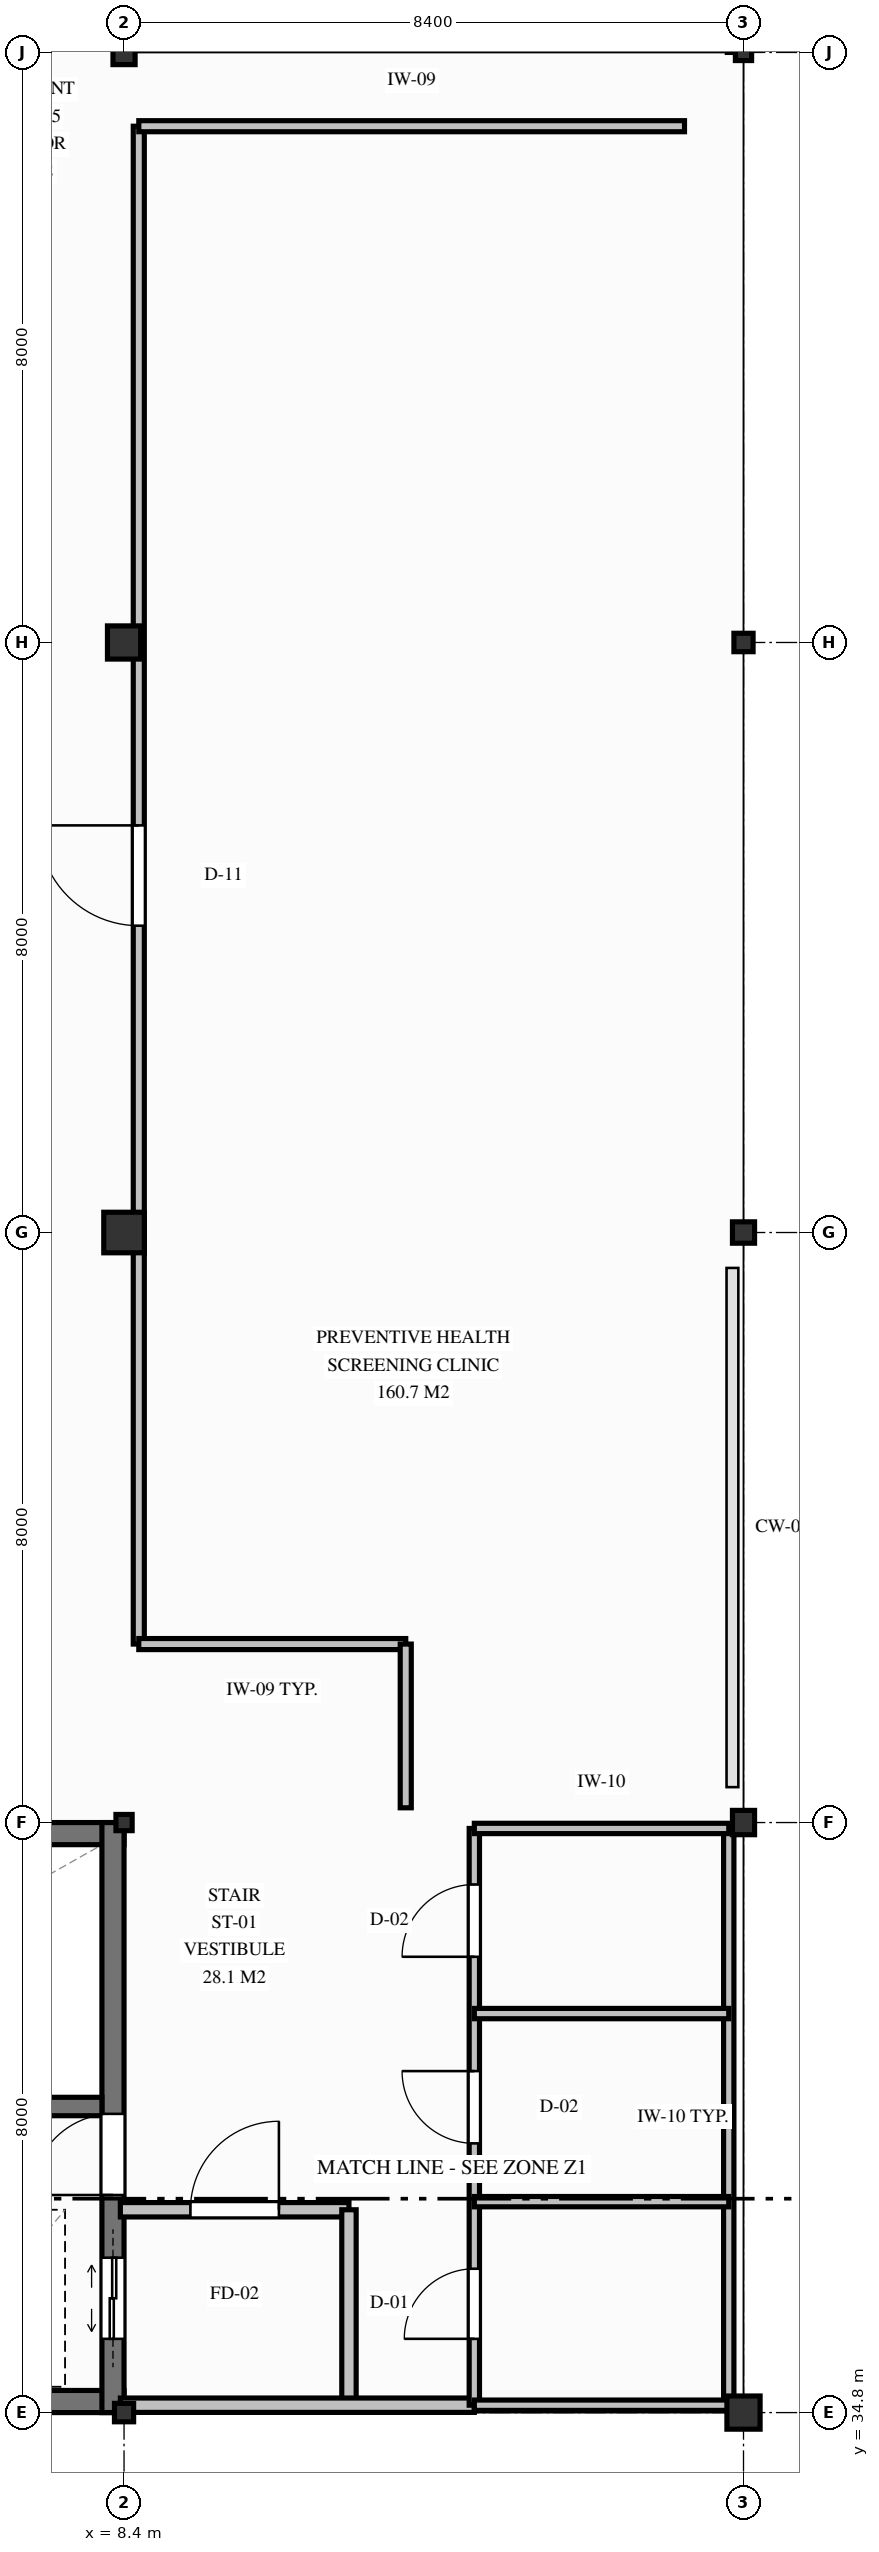
"""IFC4 building model, lengths in metres.
Left out: names, types, materials, properties, quantities, classifications, styles, units other than length and angle.
Written with IfcOpenShell. Run it as: python <this file> out.ifc"""

import sys

from ifc_helpers import new_model, si_unit, direction, frame, frame_2d, origin, origin_2d, place, context, subcontext, project, spatial, rectangle, hollow_rectangle, i_section, extrude, element, fill, save


model = new_model("IFC4")
c1 = context("Model", 3, precision=1e-05, world=origin(), true_north=direction((0.0, 1.0)))
c2 = subcontext(c1, "Body", "Model", "MODEL_VIEW")
j1 = project(units=[si_unit("LENGTHUNIT", "METRE"), si_unit("PLANEANGLEUNIT", "RADIAN")], contexts=[c1])
p1 = place(None, origin())
s1 = spatial("IfcSite", under=j1, at=p1, CompositionType="ELEMENT")
p2 = place(p1, origin())
s2 = spatial("IfcBuilding", under=s1, at=p2, CompositionType="ELEMENT")
p3 = place(p2, frame((0.0, 0.0, 21.3)))
s3 = spatial("IfcBuildingStorey", under=s2, at=p3, CompositionType="ELEMENT", Elevation=21.3)
for number, where, z_axis, x_axis in (
    (1, (0.0, 42.65, 0.0), (0.0, 0.0, 1.0), (1.0, 0.0, 0.0)),
    (2, (0.0, 34.95, 0.0), (0.0, 0.0, 1.0), (1.0, 0.0, 0.0)),
):
    element("IfcWall", number, at=place(p3, frame(where, z_axis=z_axis, x_axis=x_axis)), inside=s3, PredefinedType="SHEAR", context=c2, shape_type="SweptSolid", body=[
        extrude(rectangle(XDim=8.4, YDim=0.3, at=frame_2d((4.2, 0.0))), origin(), (0.0, 0.0, 1.0), 5.15),
    ])
p4 = place(p3, frame((8.25, 34.8, 0.0), z_axis=(0.0, 0.0, 1.0), x_axis=(0.0, 1.0, 0.0)))
e3 = element("IfcWall", 3, at=p4, inside=s3, PredefinedType="SHEAR", context=c2, shape_type="SweptSolid", body=[
    extrude(rectangle(XDim=8.0, YDim=0.3, at=frame_2d((4.0, 0.0))), origin(), (0.0, 0.0, 1.0), 5.15),
])
p5 = place(p4, frame((2.95, 0.0, 0.0)))
e4 = element("IfcOpeningElement", 4, at=p5, cuts=e3, PredefinedType="OPENING", context=c2, shape_type="SweptSolid", body=[
    extrude(rectangle(XDim=1.1, YDim=2.15, at=frame_2d((0.55, 1.075))), frame((0.0, 0.16, 0.0), z_axis=(0.0, -1.0, 0.0), x_axis=(1.0, 0.0, 0.0)), (0.0, 0.0, 1.0), 0.32),
])
p6 = place(p4, frame((1.0, 0.0, 0.0)))
e5 = element("IfcOpeningElement", 5, at=p6, cuts=e3, PredefinedType="OPENING", context=c2, shape_type="SweptSolid", body=[
    extrude(rectangle(XDim=1.1, YDim=2.1, at=frame_2d((0.55, 1.05))), frame((0.0, 0.16, 0.0), z_axis=(0.0, -1.0, 0.0), x_axis=(1.0, 0.0, 0.0)), (0.0, 0.0, 1.0), 0.32),
])
p7 = place(p3, frame((0.3, 38.95, 0.0), z_axis=(0.0, 0.0, 1.0), x_axis=(1.0, 0.0, 0.0)))
e6 = element("IfcWall", 6, at=p7, inside=s3, PredefinedType="SHEAR", context=c2, shape_type="SweptSolid", body=[
    extrude(rectangle(XDim=7.8, YDim=0.25, at=frame_2d((3.9, 0.0))), origin(), (0.0, 0.0, 1.0), 5.15),
])
p8 = place(p7, frame((0.4, 0.0, 0.0)))
e7 = element("IfcOpeningElement", 7, at=p8, cuts=e6, PredefinedType="OPENING", context=c2, shape_type="SweptSolid", body=[
    extrude(rectangle(XDim=1.1, YDim=2.15, at=frame_2d((0.55, 1.075))), frame((0.0, 0.135, 0.0), z_axis=(0.0, -1.0, 0.0), x_axis=(1.0, 0.0, 0.0)), (0.0, 0.0, 1.0), 0.27),
])
p9 = place(p3, frame((8.4, 34.8, 0.0), z_axis=(0.0, 0.0, 1.0), x_axis=(1.0, 0.0, 0.0)))
e8 = element("IfcColumn", 8, at=p9, inside=s3, PredefinedType="COLUMN", context=c2, shape_type="SweptSolid", body=[
    extrude(i_section(OverallWidth=0.26, OverallDepth=0.25, WebThickness=0.008, FlangeThickness=0.012, FilletRadius=0.024, at=origin_2d()), origin(), (0.0, 0.0, 1.0), 4.05),
])
p10 = place(p3, frame((8.4, 42.8, 0.0), z_axis=(0.0, 0.0, 1.0), x_axis=(1.0, 0.0, 0.0)))
e9 = element("IfcColumn", 9, at=p10, inside=s3, PredefinedType="COLUMN", context=c2, shape_type="SweptSolid", body=[
    extrude(hollow_rectangle(XDim=0.22, YDim=0.22, WallThickness=0.012, InnerFilletRadius=0.019, OuterFilletRadius=0.031, at=origin_2d()), origin(), (0.0, 0.0, 1.0), 4.05),
])
p11 = place(p3, frame((8.4, 50.8, 0.0), z_axis=(0.0, 0.0, 1.0), x_axis=(1.0, 0.0, 0.0)))
e10 = element("IfcColumn", 10, at=p11, inside=s3, PredefinedType="COLUMN", context=c2, shape_type="SweptSolid", body=[
    extrude(rectangle(XDim=0.55, YDim=0.55, at=origin_2d()), origin(), (0.0, 0.0, 1.0), 4.05),
])
p12 = place(p3, frame((8.4, 58.8, 0.0), z_axis=(0.0, 0.0, 1.0), x_axis=(1.0, 0.0, 0.0)))
e11 = element("IfcColumn", 11, at=p12, inside=s3, PredefinedType="COLUMN", context=c2, shape_type="SweptSolid", body=[
    extrude(rectangle(XDim=0.45, YDim=0.45, at=origin_2d()), origin(), (0.0, 0.0, 1.0), 4.05),
])
p13 = place(p3, frame((8.4, 66.8, 0.0), z_axis=(0.0, 0.0, 1.0), x_axis=(1.0, 0.0, 0.0)))
e12 = element("IfcColumn", 12, at=p13, inside=s3, PredefinedType="COLUMN", context=c2, shape_type="SweptSolid", body=[
    extrude(i_section(OverallWidth=0.3, OverallDepth=0.33, WebThickness=0.01, FlangeThickness=0.017, FilletRadius=0.027, at=origin_2d()), origin(), (0.0, 0.0, 1.0), 4.05),
])
p14 = place(p3, frame((16.8, 34.8, 0.0), z_axis=(0.0, 0.0, 1.0), x_axis=(1.0, 0.0, 0.0)))
e13 = element("IfcColumn", 13, at=p14, inside=s3, PredefinedType="COLUMN", context=c2, shape_type="SweptSolid", body=[
    extrude(rectangle(XDim=0.45, YDim=0.45, at=origin_2d()), origin(), (0.0, 0.0, 1.0), 4.05),
])
p15 = place(p3, frame((16.8, 42.8, 0.0), z_axis=(0.0, 0.0, 1.0), x_axis=(1.0, 0.0, 0.0)))
e14 = element("IfcColumn", 14, at=p15, inside=s3, PredefinedType="COLUMN", context=c2, shape_type="SweptSolid", body=[
    extrude(i_section(OverallWidth=0.3, OverallDepth=0.33, WebThickness=0.01, FlangeThickness=0.017, FilletRadius=0.027, at=origin_2d()), origin(), (0.0, 0.0, 1.0), 4.05),
])
p16 = place(p3, frame((16.8, 50.8, 0.0), z_axis=(0.0, 0.0, 1.0), x_axis=(1.0, 0.0, 0.0)))
e15 = element("IfcColumn", 15, at=p16, inside=s3, PredefinedType="COLUMN", context=c2, shape_type="SweptSolid", body=[
    extrude(i_section(OverallWidth=0.3, OverallDepth=0.29, WebThickness=0.009, FlangeThickness=0.014, FilletRadius=0.027, at=origin_2d()), origin(), (0.0, 0.0, 1.0), 4.05),
])
p17 = place(p3, frame((16.8, 58.8, 0.0), z_axis=(0.0, 0.0, 1.0), x_axis=(1.0, 0.0, 0.0)))
e16 = element("IfcColumn", 16, at=p17, inside=s3, PredefinedType="COLUMN", context=c2, shape_type="SweptSolid", body=[
    extrude(i_section(OverallWidth=0.26, OverallDepth=0.25, WebThickness=0.008, FlangeThickness=0.012, FilletRadius=0.024, at=origin_2d()), origin(), (0.0, 0.0, 1.0), 4.05),
])
p18 = place(p3, frame((16.8, 66.8, 0.0), z_axis=(0.0, 0.0, 1.0), x_axis=(1.0, 0.0, 0.0)))
e17 = element("IfcColumn", 17, at=p18, inside=s3, PredefinedType="COLUMN", context=c2, shape_type="SweptSolid", body=[
    extrude(hollow_rectangle(XDim=0.22, YDim=0.22, WallThickness=0.012, InnerFilletRadius=0.019, OuterFilletRadius=0.031, at=origin_2d()), origin(), (0.0, 0.0, 1.0), 4.05),
])
p19 = place(p3, frame((8.35, 37.55, 0.0), z_axis=(0.0, 0.0, 1.0), x_axis=(1.0, 0.0, 0.0)))
e18 = element("IfcWall", 18, at=p19, inside=s3, PredefinedType="PARTITIONING", context=c2, shape_type="SweptSolid", body=[
    extrude(rectangle(XDim=3.1, YDim=0.195, at=frame_2d((1.55, 0.0))), origin(), (0.0, 0.0, 1.0), 3.178),
])
p20 = place(p19, frame((0.95, 0.0, 0.0)))
e19 = element("IfcOpeningElement", 19, at=p20, cuts=e18, PredefinedType="OPENING", context=c2, shape_type="SweptSolid", body=[
    extrude(rectangle(XDim=1.2, YDim=2.15, at=frame_2d((0.6, 1.075))), frame((0.0, 0.107, 0.0), z_axis=(0.0, -1.0, 0.0), x_axis=(1.0, 0.0, 0.0)), (0.0, 0.0, 1.0), 0.215),
])
p21 = place(p3, frame((11.45, 34.9, 0.0), z_axis=(0.0, 0.0, 1.0), x_axis=(0.0, 1.0, 0.0)))
e20 = element("IfcWall", 20, at=p21, inside=s3, PredefinedType="PARTITIONING", context=c2, shape_type="SweptSolid", body=[
    extrude(rectangle(XDim=2.65, YDim=0.195, at=frame_2d((1.325, 0.0))), origin(), (0.0, 0.0, 1.0), 3.328),
])
p22 = place(p3, frame((8.35, 34.9, 0.0), z_axis=(0.0, 0.0, 1.0), x_axis=(1.0, 0.0, 0.0)))
e21 = element("IfcWall", 21, at=p22, inside=s3, PredefinedType="PARTITIONING", context=c2, shape_type="SweptSolid", body=[
    extrude(rectangle(XDim=4.8, YDim=0.195, at=frame_2d((2.4, 0.0))), origin(), (0.0, 0.0, 1.0), 3.178),
])
p23 = place(p3, frame((13.15, 34.9, 0.0), z_axis=(0.0, 0.0, 1.0), x_axis=(0.0, 1.0, 0.0)))
e22 = element("IfcWall", 22, at=p23, inside=s3, PredefinedType="PARTITIONING", context=c2, shape_type="SweptSolid", body=[
    extrude(rectangle(XDim=7.82, YDim=0.14, at=frame_2d((3.91, 0.0))), origin(), (0.0, 0.0, 1.0), 3.328),
])
p24 = place(p23, frame((0.9, 0.0, 0.0)))
e23 = element("IfcOpeningElement", 23, at=p24, cuts=e22, PredefinedType="OPENING", context=c2, shape_type="SweptSolid", body=[
    extrude(rectangle(XDim=0.95, YDim=2.12, at=frame_2d((0.475, 1.06))), frame((0.0, 0.08, 0.0), z_axis=(0.0, -1.0, 0.0), x_axis=(1.0, 0.0, 0.0)), (0.0, 0.0, 1.0), 0.16),
])
p25 = place(p23, frame((3.55, 0.0, 0.0)))
e24 = element("IfcOpeningElement", 24, at=p25, cuts=e22, PredefinedType="OPENING", context=c2, shape_type="SweptSolid", body=[
    extrude(rectangle(XDim=0.98, YDim=2.14, at=frame_2d((0.49, 1.07))), frame((0.0, 0.08, 0.0), z_axis=(0.0, -1.0, 0.0), x_axis=(1.0, 0.0, 0.0)), (0.0, 0.0, 1.0), 0.16),
])
p26 = place(p23, frame((6.08, 0.0, 0.0)))
e25 = element("IfcOpeningElement", 25, at=p26, cuts=e22, PredefinedType="OPENING", context=c2, shape_type="SweptSolid", body=[
    extrude(rectangle(XDim=0.98, YDim=2.14, at=frame_2d((0.49, 1.07))), frame((0.0, 0.08, 0.0), z_axis=(0.0, -1.0, 0.0), x_axis=(1.0, 0.0, 0.0)), (0.0, 0.0, 1.0), 0.16),
])
p27 = place(p3, frame((16.6, 34.9, 0.0), z_axis=(0.0, 0.0, 1.0), x_axis=(0.0, 1.0, 0.0)))
e26 = element("IfcWall", 26, at=p27, inside=s3, PredefinedType="PARTITIONING", context=c2, shape_type="SweptSolid", body=[
    extrude(rectangle(XDim=7.82, YDim=0.14, at=frame_2d((3.91, 0.0))), origin(), (0.0, 0.0, 1.0), 3.328),
])
for number, where, z_axis, x_axis in (
    (27, (13.15, 34.9, 0.0), (0.0, 0.0, 1.0), (1.0, 0.0, 0.0)),
    (28, (13.15, 42.72, 0.0), (0.0, 0.0, 1.0), (1.0, 0.0, 0.0)),
    (29, (13.15, 37.66, 0.0), (0.0, 0.0, 1.0), (1.0, 0.0, 0.0)),
    (30, (13.15, 40.21, 0.0), (0.0, 0.0, 1.0), (1.0, 0.0, 0.0)),
):
    element("IfcWall", number, at=place(p3, frame(where, z_axis=z_axis, x_axis=x_axis)), inside=s3, PredefinedType="PARTITIONING", context=c2, shape_type="SweptSolid", body=[
        extrude(rectangle(XDim=3.45, YDim=0.14, at=frame_2d((1.725, 0.0))), origin(), (0.0, 0.0, 1.0), 3.328),
    ])
p28 = place(p3, frame((8.6, 45.22, 0.0), z_axis=(0.0, 0.0, 1.0), x_axis=(0.0, 1.0, 0.0)))
e31 = element("IfcWall", 31, at=p28, inside=s3, PredefinedType="PARTITIONING", context=c2, shape_type="SweptSolid", body=[
    extrude(rectangle(XDim=20.58, YDim=0.15, at=frame_2d((10.29, 0.0))), origin(), (0.0, 0.0, 1.0), 3.328),
])
p29 = place(p28, frame((9.74, 0.0, 0.0)))
e32 = element("IfcOpeningElement", 32, at=p29, cuts=e31, PredefinedType="OPENING", context=c2, shape_type="SweptSolid", body=[
    extrude(rectangle(XDim=1.36, YDim=2.2, at=frame_2d((0.68, 1.1))), frame((0.0, 0.085, 0.0), z_axis=(0.0, -1.0, 0.0), x_axis=(1.0, 0.0, 0.0)), (0.0, 0.0, 1.0), 0.17),
])
p30 = place(p3, frame((12.22, 45.22, 0.0), z_axis=(0.0, 0.0, 1.0), x_axis=(-1.0, 0.0, 0.0)))
e33 = element("IfcWall", 33, at=p30, inside=s3, PredefinedType="PARTITIONING", context=c2, shape_type="SweptSolid", body=[
    extrude(rectangle(XDim=3.62, YDim=0.15, at=frame_2d((1.81, 0.0))), origin(), (0.0, 0.0, 1.0), 3.328),
])
p31 = place(p3, frame((12.22, 43.0, 0.0), z_axis=(0.0, 0.0, 1.0), x_axis=(0.0, 1.0, 0.0)))
e34 = element("IfcWall", 34, at=p31, inside=s3, PredefinedType="PARTITIONING", context=c2, shape_type="SweptSolid", body=[
    extrude(rectangle(XDim=2.22, YDim=0.15, at=frame_2d((1.11, 0.0))), origin(), (0.0, 0.0, 1.0), 3.338),
])
p32 = place(p3, frame((8.6, 65.8, 0.0), z_axis=(0.0, 0.0, 1.0), x_axis=(1.0, 0.0, 0.0)))
e35 = element("IfcWall", 35, at=p32, inside=s3, PredefinedType="PARTITIONING", context=c2, shape_type="SweptSolid", body=[
    extrude(rectangle(XDim=7.4, YDim=0.15, at=frame_2d((3.7, 0.0))), origin(), (0.0, 0.0, 1.0), 3.438),
])
p33 = place(p5, origin())
e36 = element("IfcDoor", 36, at=p33, inside=s3, OperationType="SINGLE_SWING_LEFT", PredefinedType="DOOR", context=c2, shape_type="SweptSolid", body=[
    extrude(rectangle(XDim=1.1, YDim=2.15, at=frame_2d((0.55, 1.075))), frame((0.0, 0.025, 0.0), z_axis=(0.0, -1.0, 0.0), x_axis=(1.0, 0.0, 0.0)), (0.0, 0.0, 1.0), 0.05),
])
fill(e4, e36)
p34 = place(p6, origin())
e37 = element("IfcDoor", 37, at=p34, inside=s3, OperationType="DOUBLE_DOOR_SLIDING", PredefinedType="DOOR", context=c2, shape_type="SweptSolid", body=[
    extrude(rectangle(XDim=1.1, YDim=2.1, at=frame_2d((0.55, 1.05))), frame((0.0, 0.025, 0.0), z_axis=(0.0, -1.0, 0.0), x_axis=(1.0, 0.0, 0.0)), (0.0, 0.0, 1.0), 0.05),
])
fill(e5, e37)
p35 = place(p20, origin())
e38 = element("IfcDoor", 38, at=p35, inside=s3, OperationType="SINGLE_SWING_RIGHT", PredefinedType="DOOR", context=c2, shape_type="SweptSolid", body=[
    extrude(rectangle(XDim=1.2, YDim=2.15, at=frame_2d((0.6, 1.075))), frame((0.0, 0.025, 0.0), z_axis=(0.0, -1.0, 0.0), x_axis=(1.0, 0.0, 0.0)), (0.0, 0.0, 1.0), 0.05),
])
fill(e19, e38)
p36 = place(p24, origin())
e39 = element("IfcDoor", 39, at=p36, inside=s3, OperationType="SINGLE_SWING_LEFT", PredefinedType="DOOR", context=c2, shape_type="SweptSolid", body=[
    extrude(rectangle(XDim=0.95, YDim=2.12, at=frame_2d((0.475, 1.06))), frame((0.0, 0.025, 0.0), z_axis=(0.0, -1.0, 0.0), x_axis=(1.0, 0.0, 0.0)), (0.0, 0.0, 1.0), 0.05),
])
fill(e23, e39)
p37 = place(p25, origin())
e40 = element("IfcDoor", 40, at=p37, inside=s3, OperationType="SINGLE_SWING_RIGHT", PredefinedType="DOOR", context=c2, shape_type="SweptSolid", body=[
    extrude(rectangle(XDim=0.98, YDim=2.14, at=frame_2d((0.49, 1.07))), frame((0.0, 0.025, 0.0), z_axis=(0.0, -1.0, 0.0), x_axis=(1.0, 0.0, 0.0)), (0.0, 0.0, 1.0), 0.05),
])
fill(e24, e40)
p38 = place(p26, origin())
e41 = element("IfcDoor", 41, at=p38, inside=s3, OperationType="SINGLE_SWING_LEFT", PredefinedType="DOOR", context=c2, shape_type="SweptSolid", body=[
    extrude(rectangle(XDim=0.98, YDim=2.14, at=frame_2d((0.49, 1.07))), frame((0.0, 0.025, 0.0), z_axis=(0.0, -1.0, 0.0), x_axis=(1.0, 0.0, 0.0)), (0.0, 0.0, 1.0), 0.05),
])
fill(e25, e41)
p39 = place(p29, origin())
e42 = element("IfcDoor", 42, at=p39, inside=s3, OperationType="SINGLE_SWING_RIGHT", PredefinedType="DOOR", context=c2, shape_type="SweptSolid", body=[
    extrude(rectangle(XDim=1.36, YDim=2.2, at=frame_2d((0.68, 1.1))), frame((0.0, 0.025, 0.0), z_axis=(0.0, -1.0, 0.0), x_axis=(1.0, 0.0, 0.0)), (0.0, 0.0, 1.0), 0.05),
])
fill(e32, e42)
save(model, sys.argv[1])
